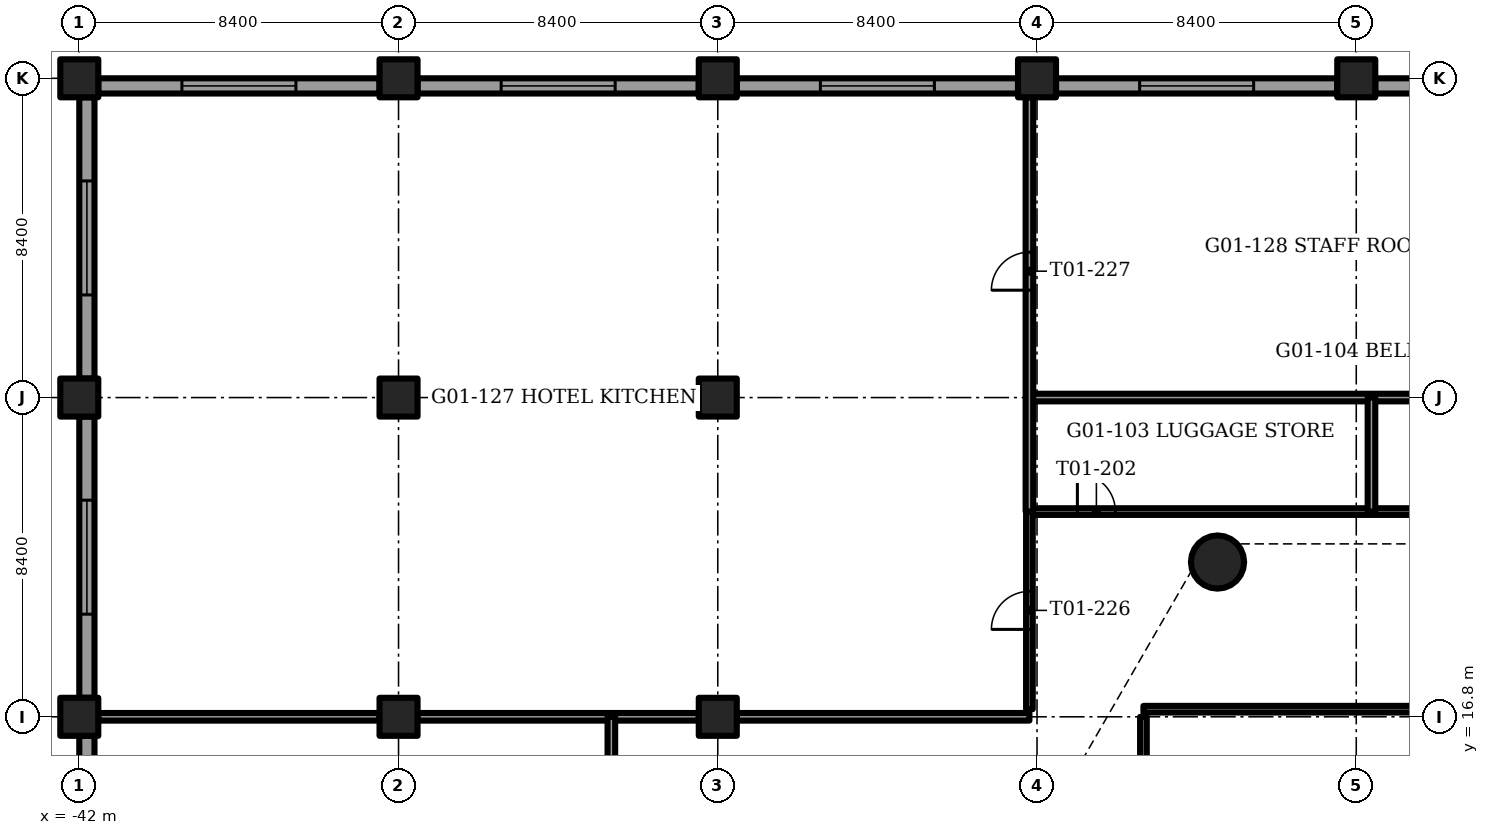
"""IFC4 building model, lengths in metres.
Left out: names, types, materials, properties, quantities, classifications, styles, units other than length and angle.
Written with IfcOpenShell. Run it as: python <this file> out.ifc"""

import sys

from ifc_helpers import new_model, si_unit, direction, frame, frame_2d, origin, origin_2d, place, context, subcontext, project, spatial, rectangle, circle, extrude, element, fill, save


model = new_model("IFC4")
c1 = context("Model", 3, precision=1e-05, world=origin(), true_north=direction((0.0, 1.0)))
c2 = subcontext(c1, "Body", "Model", "MODEL_VIEW")
j1 = project(units=[si_unit("LENGTHUNIT", "METRE"), si_unit("PLANEANGLEUNIT", "RADIAN")], contexts=[c1])
p1 = place(None, origin())
s1 = spatial("IfcSite", under=j1, at=p1, CompositionType="ELEMENT")
p2 = place(p1, origin())
s2 = spatial("IfcBuilding", under=s1, at=p2, CompositionType="ELEMENT")
p3 = place(p2, frame((0.0, 0.0, 6.0)))
s3 = spatial("IfcBuildingStorey", under=s2, at=p3, CompositionType="ELEMENT", Elevation=6.0)
for number, where, z_axis, x_axis in (
    (1, (-42.0, 16.8, -0.35), (0.0, 0.0, 1.0), (1.0, 0.0, 0.0)),
    (2, (-42.0, 25.2, -0.35), (0.0, 0.0, 1.0), (1.0, 0.0, 0.0)),
    (3, (-42.0, 33.6, -0.35), (0.0, 0.0, 1.0), (1.0, 0.0, 0.0)),
    (4, (-33.6, 16.8, -0.35), (0.0, 0.0, 1.0), (1.0, 0.0, 0.0)),
    (5, (-33.6, 25.2, -0.35), (0.0, 0.0, 1.0), (1.0, 0.0, 0.0)),
    (6, (-33.6, 33.6, -0.35), (0.0, 0.0, 1.0), (1.0, 0.0, 0.0)),
    (7, (-25.2, 16.8, -0.35), (0.0, 0.0, 1.0), (1.0, 0.0, 0.0)),
    (8, (-25.2, 25.2, -0.35), (0.0, 0.0, 1.0), (1.0, 0.0, 0.0)),
    (9, (-25.2, 33.6, -0.35), (0.0, 0.0, 1.0), (1.0, 0.0, 0.0)),
    (10, (-16.8, 33.6, -0.35), (0.0, 0.0, 1.0), (1.0, 0.0, 0.0)),
    (11, (-8.4, 33.6, -0.35), (0.0, 0.0, 1.0), (1.0, 0.0, 0.0)),
):
    element("IfcColumn", number, at=place(p3, frame(where, z_axis=z_axis, x_axis=x_axis)), inside=s3, PredefinedType="COLUMN", context=c2, shape_type="SweptSolid", body=[
        extrude(rectangle(XDim=1.0, YDim=1.0, at=origin_2d()), origin(), (0.0, 0.0, 1.0), 4.0),
    ])
p4 = place(p3, frame((-12.051, 20.872, -1.2), z_axis=(0.0, 0.0, 1.0), x_axis=(1.0, 0.0, 0.0)))
e12 = element("IfcColumn", 12, at=p4, inside=s3, PredefinedType="COLUMN", context=c2, shape_type="SweptSolid", body=[
    extrude(circle(Radius=0.7, at=origin_2d()), origin(), (0.0, 0.0, 1.0), 4.0),
])
p5 = place(p3, frame((-41.5, 33.4, 0.0), z_axis=(0.0, 0.0, 1.0), x_axis=(1.0, 0.0, 0.0)))
e13 = element("IfcWall", 13, at=p5, inside=s3, PredefinedType="SOLIDWALL", context=c2, shape_type="SweptSolid", body=[
    extrude(rectangle(XDim=7.4, YDim=0.4, at=frame_2d((3.7, 0.0))), origin(), (0.0, 0.0, 1.0), 3.65),
])
p6 = place(p5, frame((2.2, 0.0, 1.0)))
e14 = element("IfcOpeningElement", 14, at=p6, cuts=e13, PredefinedType="OPENING", context=c2, shape_type="SweptSolid", body=[
    extrude(rectangle(XDim=3.0, YDim=2.2, at=frame_2d((1.5, 1.1))), frame((0.0, 0.2, 0.0), z_axis=(0.0, -1.0, 0.0), x_axis=(1.0, 0.0, 0.0)), (0.0, 0.0, 1.0), 0.4),
])
p7 = place(p3, frame((-33.1, 33.4, 0.0), z_axis=(0.0, 0.0, 1.0), x_axis=(1.0, 0.0, 0.0)))
e15 = element("IfcWall", 15, at=p7, inside=s3, PredefinedType="SOLIDWALL", context=c2, shape_type="SweptSolid", body=[
    extrude(rectangle(XDim=7.4, YDim=0.4, at=frame_2d((3.7, 0.0))), origin(), (0.0, 0.0, 1.0), 3.65),
])
p8 = place(p7, frame((2.2, 0.0, 1.0)))
e16 = element("IfcOpeningElement", 16, at=p8, cuts=e15, PredefinedType="OPENING", context=c2, shape_type="SweptSolid", body=[
    extrude(rectangle(XDim=3.0, YDim=2.2, at=frame_2d((1.5, 1.1))), frame((0.0, 0.2, 0.0), z_axis=(0.0, -1.0, 0.0), x_axis=(1.0, 0.0, 0.0)), (0.0, 0.0, 1.0), 0.4),
])
p9 = place(p3, frame((-24.7, 33.4, 0.0), z_axis=(0.0, 0.0, 1.0), x_axis=(1.0, 0.0, 0.0)))
e17 = element("IfcWall", 17, at=p9, inside=s3, PredefinedType="SOLIDWALL", context=c2, shape_type="SweptSolid", body=[
    extrude(rectangle(XDim=7.4, YDim=0.4, at=frame_2d((3.7, 0.0))), origin(), (0.0, 0.0, 1.0), 3.65),
])
p10 = place(p9, frame((2.2, 0.0, 1.0)))
e18 = element("IfcOpeningElement", 18, at=p10, cuts=e17, PredefinedType="OPENING", context=c2, shape_type="SweptSolid", body=[
    extrude(rectangle(XDim=3.0, YDim=2.2, at=frame_2d((1.5, 1.1))), frame((0.0, 0.2, 0.0), z_axis=(0.0, -1.0, 0.0), x_axis=(1.0, 0.0, 0.0)), (0.0, 0.0, 1.0), 0.4),
])
p11 = place(p3, frame((-16.3, 33.4, 0.0), z_axis=(0.0, 0.0, 1.0), x_axis=(1.0, 0.0, 0.0)))
e19 = element("IfcWall", 19, at=p11, inside=s3, PredefinedType="SOLIDWALL", context=c2, shape_type="SweptSolid", body=[
    extrude(rectangle(XDim=7.4, YDim=0.4, at=frame_2d((3.7, 0.0))), origin(), (0.0, 0.0, 1.0), 3.65),
])
p12 = place(p11, frame((2.2, 0.0, 1.0)))
e20 = element("IfcOpeningElement", 20, at=p12, cuts=e19, PredefinedType="OPENING", context=c2, shape_type="SweptSolid", body=[
    extrude(rectangle(XDim=3.0, YDim=2.2, at=frame_2d((1.5, 1.1))), frame((0.0, 0.2, 0.0), z_axis=(0.0, -1.0, 0.0), x_axis=(1.0, 0.0, 0.0)), (0.0, 0.0, 1.0), 0.4),
])
p13 = place(p3, frame((-7.9, 33.4, 0.0), z_axis=(0.0, 0.0, 1.0), x_axis=(1.0, 0.0, 0.0)))
e21 = element("IfcWall", 21, at=p13, inside=s3, PredefinedType="SOLIDWALL", context=c2, shape_type="SweptSolid", body=[
    extrude(rectangle(XDim=7.4, YDim=0.4, at=frame_2d((3.7, 0.0))), origin(), (0.0, 0.0, 1.0), 3.65),
])
p14 = place(p13, frame((2.2, 0.0, 1.0)))
e22 = element("IfcOpeningElement", 22, at=p14, cuts=e21, PredefinedType="OPENING", context=c2, shape_type="SweptSolid", body=[
    extrude(rectangle(XDim=3.0, YDim=2.2, at=frame_2d((1.5, 1.1))), frame((0.0, 0.2, 0.0), z_axis=(0.0, -1.0, 0.0), x_axis=(1.0, 0.0, 0.0)), (0.0, 0.0, 1.0), 0.4),
])
p15 = place(p3, frame((-41.8, 8.9, 0.0), z_axis=(0.0, 0.0, 1.0), x_axis=(0.0, 1.0, 0.0)))
e23 = element("IfcWall", 23, at=p15, inside=s3, PredefinedType="SOLIDWALL", context=c2, shape_type="SweptSolid", body=[
    extrude(rectangle(XDim=7.4, YDim=0.4, at=frame_2d((3.7, 0.0))), origin(), (0.0, 0.0, 1.0), 3.65),
])
p16 = place(p15, frame((2.2, 0.0, 1.0)))
e24 = element("IfcOpeningElement", 24, at=p16, cuts=e23, PredefinedType="OPENING", context=c2, shape_type="SweptSolid", body=[
    extrude(rectangle(XDim=3.0, YDim=2.2, at=frame_2d((1.5, 1.1))), frame((0.0, 0.2, 0.0), z_axis=(0.0, -1.0, 0.0), x_axis=(1.0, 0.0, 0.0)), (0.0, 0.0, 1.0), 0.4),
])
p17 = place(p3, frame((-41.8, 17.3, 0.0), z_axis=(0.0, 0.0, 1.0), x_axis=(0.0, 1.0, 0.0)))
e25 = element("IfcWall", 25, at=p17, inside=s3, PredefinedType="SOLIDWALL", context=c2, shape_type="SweptSolid", body=[
    extrude(rectangle(XDim=7.4, YDim=0.4, at=frame_2d((3.7, 0.0))), origin(), (0.0, 0.0, 1.0), 3.65),
])
p18 = place(p17, frame((2.2, 0.0, 1.0)))
e26 = element("IfcOpeningElement", 26, at=p18, cuts=e25, PredefinedType="OPENING", context=c2, shape_type="SweptSolid", body=[
    extrude(rectangle(XDim=3.0, YDim=2.2, at=frame_2d((1.5, 1.1))), frame((0.0, 0.2, 0.0), z_axis=(0.0, -1.0, 0.0), x_axis=(1.0, 0.0, 0.0)), (0.0, 0.0, 1.0), 0.4),
])
p19 = place(p3, frame((-41.8, 25.7, 0.0), z_axis=(0.0, 0.0, 1.0), x_axis=(0.0, 1.0, 0.0)))
e27 = element("IfcWall", 27, at=p19, inside=s3, PredefinedType="SOLIDWALL", context=c2, shape_type="SweptSolid", body=[
    extrude(rectangle(XDim=7.4, YDim=0.4, at=frame_2d((3.7, 0.0))), origin(), (0.0, 0.0, 1.0), 3.65),
])
p20 = place(p19, frame((2.2, 0.0, 1.0)))
e28 = element("IfcOpeningElement", 28, at=p20, cuts=e27, PredefinedType="OPENING", context=c2, shape_type="SweptSolid", body=[
    extrude(rectangle(XDim=3.0, YDim=2.2, at=frame_2d((1.5, 1.1))), frame((0.0, 0.2, 0.0), z_axis=(0.0, -1.0, 0.0), x_axis=(1.0, 0.0, 0.0)), (0.0, 0.0, 1.0), 0.4),
])
p21 = place(p3, frame((-14.0, 17.0, 0.0), z_axis=(0.0, 0.0, 1.0), x_axis=(1.0, 0.0, 0.0)))
e29 = element("IfcWall", 29, at=p21, inside=s3, PredefinedType="PARTITIONING", context=c2, shape_type="SweptSolid", body=[
    extrude(rectangle(XDim=28.0, YDim=0.175, at=frame_2d((14.0, 0.0))), origin(), (0.0, 0.0, 1.0), 3.65),
])
p22 = place(p21, frame((13.2, 0.0, 0.0)))
e30 = element("IfcOpeningElement", 30, at=p22, cuts=e29, PredefinedType="OPENING", context=c2, shape_type="SweptSolid", body=[
    extrude(rectangle(XDim=1.6, YDim=2.1, at=frame_2d((0.8, 1.05))), frame((0.0, 0.087, 0.0), z_axis=(0.0, -1.0, 0.0), x_axis=(1.0, 0.0, 0.0)), (0.0, 0.0, 1.0), 0.175),
])
p23 = place(p3, frame((-17.0, 22.2, 0.0), z_axis=(0.0, 0.0, 1.0), x_axis=(1.0, 0.0, 0.0)))
e31 = element("IfcWall", 31, at=p23, inside=s3, PredefinedType="PARTITIONING", context=c2, shape_type="SweptSolid", body=[
    extrude(rectangle(XDim=42.2, YDim=0.175, at=frame_2d((21.1, 0.0))), origin(), (0.0, 0.0, 1.0), 3.65),
])
p24 = place(p23, frame((1.262, 0.0, 0.0)))
e32 = element("IfcOpeningElement", 32, at=p24, cuts=e31, PredefinedType="OPENING", context=c2, shape_type="SweptSolid", body=[
    extrude(rectangle(XDim=1.0, YDim=2.1, at=frame_2d((0.5, 1.05))), frame((0.0, 0.087, 0.0), z_axis=(0.0, -1.0, 0.0), x_axis=(1.0, 0.0, 0.0)), (0.0, 0.0, 1.0), 0.175),
])
p25 = place(p23, frame((15.344, 0.0, 0.0)))
e33 = element("IfcOpeningElement", 33, at=p25, cuts=e31, PredefinedType="OPENING", context=c2, shape_type="SweptSolid", body=[
    extrude(rectangle(XDim=1.0, YDim=2.1, at=frame_2d((0.5, 1.05))), frame((0.0, 0.087, 0.0), z_axis=(0.0, -1.0, 0.0), x_axis=(1.0, 0.0, 0.0)), (0.0, 0.0, 1.0), 0.175),
])
p26 = place(p23, frame((17.656, 0.0, 0.0)))
e34 = element("IfcOpeningElement", 34, at=p26, cuts=e31, PredefinedType="OPENING", context=c2, shape_type="SweptSolid", body=[
    extrude(rectangle(XDim=1.0, YDim=2.1, at=frame_2d((0.5, 1.05))), frame((0.0, 0.087, 0.0), z_axis=(0.0, -1.0, 0.0), x_axis=(1.0, 0.0, 0.0)), (0.0, 0.0, 1.0), 0.175),
])
p27 = place(p23, frame((31.488, 0.0, 0.0)))
e35 = element("IfcOpeningElement", 35, at=p27, cuts=e31, PredefinedType="OPENING", context=c2, shape_type="SweptSolid", body=[
    extrude(rectangle(XDim=1.0, YDim=2.1, at=frame_2d((0.5, 1.05))), frame((0.0, 0.087, 0.0), z_axis=(0.0, -1.0, 0.0), x_axis=(1.0, 0.0, 0.0)), (0.0, 0.0, 1.0), 0.175),
])
p28 = place(p23, frame((37.35, 0.0, 0.0)))
e36 = element("IfcOpeningElement", 36, at=p28, cuts=e31, PredefinedType="OPENING", context=c2, shape_type="SweptSolid", body=[
    extrude(rectangle(XDim=1.0, YDim=2.1, at=frame_2d((0.5, 1.05))), frame((0.0, 0.087, 0.0), z_axis=(0.0, -1.0, 0.0), x_axis=(1.0, 0.0, 0.0)), (0.0, 0.0, 1.0), 0.175),
])
p29 = place(p3, frame((-17.0, 17.0, 0.0), z_axis=(0.0, 0.0, 1.0), x_axis=(0.0, 1.0, 0.0)))
e37 = element("IfcWall", 37, at=p29, inside=s3, PredefinedType="PARTITIONING", context=c2, shape_type="SweptSolid", body=[
    extrude(rectangle(XDim=5.2, YDim=0.175, at=frame_2d((2.6, 0.0))), origin(), (0.0, 0.0, 1.0), 3.65),
])
p30 = place(p29, frame((2.1, 0.0, 0.0)))
e38 = element("IfcOpeningElement", 38, at=p30, cuts=e37, PredefinedType="OPENING", context=c2, shape_type="SweptSolid", body=[
    extrude(rectangle(XDim=1.0, YDim=2.1, at=frame_2d((0.5, 1.05))), frame((0.0, 0.087, 0.0), z_axis=(0.0, -1.0, 0.0), x_axis=(1.0, 0.0, 0.0)), (0.0, 0.0, 1.0), 0.175),
])
p31 = place(p3, frame((-14.0, -29.195, 0.0), z_axis=(0.0, 0.0, 1.0), x_axis=(0.0, 1.0, 0.0)))
e39 = element("IfcWall", 39, at=p31, inside=s3, PredefinedType="PARTITIONING", context=c2, shape_type="SweptSolid", body=[
    extrude(rectangle(XDim=45.995, YDim=0.175, at=frame_2d((22.998, 0.0))), origin(), (0.0, 0.0, 1.0), 2.8),
])
p32 = place(p31, frame((4.395, 0.0, 0.0)))
e40 = element("IfcOpeningElement", 40, at=p32, cuts=e39, PredefinedType="OPENING", context=c2, shape_type="SweptSolid", body=[
    extrude(rectangle(XDim=1.6, YDim=2.1, at=frame_2d((0.8, 1.05))), frame((0.0, 0.087, 0.0), z_axis=(0.0, -1.0, 0.0), x_axis=(1.0, 0.0, 0.0)), (0.0, 0.0, 1.0), 0.175),
])
p33 = place(p31, frame((9.815, 0.0, 0.0)))
e41 = element("IfcOpeningElement", 41, at=p33, cuts=e39, PredefinedType="OPENING", context=c2, shape_type="SweptSolid", body=[
    extrude(rectangle(XDim=0.9, YDim=2.1, at=frame_2d((0.45, 1.05))), frame((0.0, 0.087, 0.0), z_axis=(0.0, -1.0, 0.0), x_axis=(1.0, 0.0, 0.0)), (0.0, 0.0, 1.0), 0.175),
])
p34 = place(p31, frame((20.595, 0.0, 0.0)))
e42 = element("IfcOpeningElement", 42, at=p34, cuts=e39, PredefinedType="OPENING", context=c2, shape_type="SweptSolid", body=[
    extrude(rectangle(XDim=1.0, YDim=2.1, at=frame_2d((0.5, 1.05))), frame((0.0, 0.087, 0.0), z_axis=(0.0, -1.0, 0.0), x_axis=(1.0, 0.0, 0.0)), (0.0, 0.0, 1.0), 0.175),
])
p35 = place(p31, frame((28.595, 0.0, 0.0)))
e43 = element("IfcOpeningElement", 43, at=p35, cuts=e39, PredefinedType="OPENING", context=c2, shape_type="SweptSolid", body=[
    extrude(rectangle(XDim=1.0, YDim=2.1, at=frame_2d((0.5, 1.05))), frame((0.0, 0.087, 0.0), z_axis=(0.0, -1.0, 0.0), x_axis=(1.0, 0.0, 0.0)), (0.0, 0.0, 1.0), 0.175),
])
p36 = place(p31, frame((35.445, 0.0, 0.0)))
e44 = element("IfcOpeningElement", 44, at=p36, cuts=e39, PredefinedType="OPENING", context=c2, shape_type="SweptSolid", body=[
    extrude(rectangle(XDim=1.0, YDim=2.1, at=frame_2d((0.5, 1.05))), frame((0.0, 0.087, 0.0), z_axis=(0.0, -1.0, 0.0), x_axis=(1.0, 0.0, 0.0)), (0.0, 0.0, 1.0), 0.175),
])
p37 = place(p31, frame((41.628, 0.0, 0.0)))
e45 = element("IfcOpeningElement", 45, at=p37, cuts=e39, PredefinedType="OPENING", context=c2, shape_type="SweptSolid", body=[
    extrude(rectangle(XDim=1.0, YDim=2.1, at=frame_2d((0.5, 1.05))), frame((0.0, 0.087, 0.0), z_axis=(0.0, -1.0, 0.0), x_axis=(1.0, 0.0, 0.0)), (0.0, 0.0, 1.0), 0.175),
])
p38 = place(p3, frame((-41.5, 16.8, 0.0), z_axis=(0.0, 0.0, 1.0), x_axis=(1.0, 0.0, 0.0)))
e46 = element("IfcWall", 46, at=p38, inside=s3, PredefinedType="PARTITIONING", context=c2, shape_type="SweptSolid", body=[
    extrude(rectangle(XDim=7.4, YDim=0.2, at=frame_2d((3.7, 0.0))), origin(), (0.0, 0.0, 1.0), 3.65),
])
p39 = place(p3, frame((-33.1, 16.8, 0.0), z_axis=(0.0, 0.0, 1.0), x_axis=(1.0, 0.0, 0.0)))
e47 = element("IfcWall", 47, at=p39, inside=s3, PredefinedType="PARTITIONING", context=c2, shape_type="SweptSolid", body=[
    extrude(rectangle(XDim=7.4, YDim=0.2, at=frame_2d((3.7, 0.0))), origin(), (0.0, 0.0, 1.0), 3.65),
])
p40 = place(p3, frame((-24.7, 16.8, 0.0), z_axis=(0.0, 0.0, 1.0), x_axis=(1.0, 0.0, 0.0)))
e48 = element("IfcWall", 48, at=p40, inside=s3, PredefinedType="PARTITIONING", context=c2, shape_type="SweptSolid", body=[
    extrude(rectangle(XDim=7.7, YDim=0.2, at=frame_2d((3.85, 0.0))), origin(), (0.0, 0.0, 1.0), 3.65),
])
p41 = place(p3, frame((-17.0, 25.2, 0.0), z_axis=(0.0, 0.0, 1.0), x_axis=(1.0, 0.0, 0.0)))
e49 = element("IfcWall", 49, at=p41, inside=s3, PredefinedType="PARTITIONING", context=c2, shape_type="SweptSolid", body=[
    extrude(rectangle(XDim=28.019, YDim=0.2, at=frame_2d((14.01, 0.0))), origin(), (0.0, 0.0, 1.0), 3.65),
])
p42 = place(p41, frame((26.209, 0.0, 0.0)))
e50 = element("IfcOpeningElement", 50, at=p42, cuts=e49, PredefinedType="OPENING", context=c2, shape_type="SweptSolid", body=[
    extrude(rectangle(XDim=1.0, YDim=2.1, at=frame_2d((0.5, 1.05))), frame((0.0, 0.1, 0.0), z_axis=(0.0, -1.0, 0.0), x_axis=(1.0, 0.0, 0.0)), (0.0, 0.0, 1.0), 0.2),
])
p43 = place(p3, frame((-28.0, -21.0, 0.0), z_axis=(0.0, 0.0, 1.0), x_axis=(0.0, 1.0, 0.0)))
e51 = element("IfcWall", 51, at=p43, inside=s3, PredefinedType="PARTITIONING", context=c2, shape_type="SweptSolid", body=[
    extrude(rectangle(XDim=37.8, YDim=0.2, at=frame_2d((18.9, 0.0))), origin(), (0.0, 0.0, 1.0), 3.65),
])
p44 = place(p43, frame((19.45, 0.0, 0.0)))
e52 = element("IfcOpeningElement", 52, at=p44, cuts=e51, PredefinedType="OPENING", context=c2, shape_type="SweptSolid", body=[
    extrude(rectangle(XDim=1.0, YDim=2.1, at=frame_2d((0.5, 1.05))), frame((0.0, 0.1, 0.0), z_axis=(0.0, -1.0, 0.0), x_axis=(1.0, 0.0, 0.0)), (0.0, 0.0, 1.0), 0.2),
])
p45 = place(p3, frame((-17.0, 22.2, 0.0), z_axis=(0.0, 0.0, 1.0), x_axis=(0.0, 1.0, 0.0)))
e53 = element("IfcWall", 53, at=p45, inside=s3, PredefinedType="PARTITIONING", context=c2, shape_type="SweptSolid", body=[
    extrude(rectangle(XDim=10.9, YDim=0.2, at=frame_2d((5.45, 0.0))), origin(), (0.0, 0.0, 1.0), 3.65),
])
p46 = place(p45, frame((5.825, 0.0, 0.0)))
e54 = element("IfcOpeningElement", 54, at=p46, cuts=e53, PredefinedType="OPENING", context=c2, shape_type="SweptSolid", body=[
    extrude(rectangle(XDim=1.0, YDim=2.1, at=frame_2d((0.5, 1.05))), frame((0.0, 0.1, 0.0), z_axis=(0.0, -1.0, 0.0), x_axis=(1.0, 0.0, 0.0)), (0.0, 0.0, 1.0), 0.2),
])
p47 = place(p3, frame((-8.0, 22.2, 0.0), z_axis=(0.0, 0.0, 1.0), x_axis=(0.0, 1.0, 0.0)))
e55 = element("IfcWall", 55, at=p47, inside=s3, PredefinedType="PARTITIONING", context=c2, shape_type="SweptSolid", body=[
    extrude(rectangle(XDim=3.0, YDim=0.2, at=frame_2d((1.5, 0.0))), origin(), (0.0, 0.0, 1.0), 3.65),
])
p48 = place(p6, origin())
e56 = element("IfcWindow", 56, at=p48, inside=s3, PartitioningType="SINGLE_PANEL", PredefinedType="WINDOW", context=c2, shape_type="SweptSolid", body=[
    extrude(rectangle(XDim=3.0, YDim=2.2, at=frame_2d((1.5, 1.1))), frame((0.0, 0.03, 0.0), z_axis=(0.0, -1.0, 0.0), x_axis=(1.0, 0.0, 0.0)), (0.0, 0.0, 1.0), 0.06),
])
fill(e14, e56)
p49 = place(p8, origin())
e57 = element("IfcWindow", 57, at=p49, inside=s3, PartitioningType="SINGLE_PANEL", PredefinedType="WINDOW", context=c2, shape_type="SweptSolid", body=[
    extrude(rectangle(XDim=3.0, YDim=2.2, at=frame_2d((1.5, 1.1))), frame((0.0, 0.03, 0.0), z_axis=(0.0, -1.0, 0.0), x_axis=(1.0, 0.0, 0.0)), (0.0, 0.0, 1.0), 0.06),
])
fill(e16, e57)
p50 = place(p10, origin())
e58 = element("IfcWindow", 58, at=p50, inside=s3, PartitioningType="SINGLE_PANEL", PredefinedType="WINDOW", context=c2, shape_type="SweptSolid", body=[
    extrude(rectangle(XDim=3.0, YDim=2.2, at=frame_2d((1.5, 1.1))), frame((0.0, 0.03, 0.0), z_axis=(0.0, -1.0, 0.0), x_axis=(1.0, 0.0, 0.0)), (0.0, 0.0, 1.0), 0.06),
])
fill(e18, e58)
p51 = place(p12, origin())
e59 = element("IfcWindow", 59, at=p51, inside=s3, PartitioningType="SINGLE_PANEL", PredefinedType="WINDOW", context=c2, shape_type="SweptSolid", body=[
    extrude(rectangle(XDim=3.0, YDim=2.2, at=frame_2d((1.5, 1.1))), frame((0.0, 0.03, 0.0), z_axis=(0.0, -1.0, 0.0), x_axis=(1.0, 0.0, 0.0)), (0.0, 0.0, 1.0), 0.06),
])
fill(e20, e59)
p52 = place(p18, origin())
e60 = element("IfcWindow", 60, at=p52, inside=s3, PartitioningType="SINGLE_PANEL", PredefinedType="WINDOW", context=c2, shape_type="SweptSolid", body=[
    extrude(rectangle(XDim=3.0, YDim=2.2, at=frame_2d((1.5, 1.1))), frame((0.0, 0.03, 0.0), z_axis=(0.0, -1.0, 0.0), x_axis=(1.0, 0.0, 0.0)), (0.0, 0.0, 1.0), 0.06),
])
fill(e26, e60)
p53 = place(p20, origin())
e61 = element("IfcWindow", 61, at=p53, inside=s3, PartitioningType="SINGLE_PANEL", PredefinedType="WINDOW", context=c2, shape_type="SweptSolid", body=[
    extrude(rectangle(XDim=3.0, YDim=2.2, at=frame_2d((1.5, 1.1))), frame((0.0, 0.03, 0.0), z_axis=(0.0, -1.0, 0.0), x_axis=(1.0, 0.0, 0.0)), (0.0, 0.0, 1.0), 0.06),
])
fill(e28, e61)
p54 = place(p24, origin())
e62 = element("IfcDoor", 62, at=p54, inside=s3, OperationType="SINGLE_SWING_RIGHT", PredefinedType="DOOR", context=c2, shape_type="SweptSolid", body=[
    extrude(rectangle(XDim=1.0, YDim=2.1, at=frame_2d((0.5, 1.05))), frame((0.0, 0.025, 0.0), z_axis=(0.0, -1.0, 0.0), x_axis=(1.0, 0.0, 0.0)), (0.0, 0.0, 1.0), 0.05),
])
fill(e32, e62)
p55 = place(p30, origin())
e63 = element("IfcDoor", 63, at=p55, inside=s3, OperationType="SINGLE_SWING_RIGHT", PredefinedType="DOOR", context=c2, shape_type="SweptSolid", body=[
    extrude(rectangle(XDim=1.0, YDim=2.1, at=frame_2d((0.5, 1.05))), frame((0.0, 0.025, 0.0), z_axis=(0.0, -1.0, 0.0), x_axis=(1.0, 0.0, 0.0)), (0.0, 0.0, 1.0), 0.05),
])
fill(e38, e63)
p56 = place(p46, origin())
e64 = element("IfcDoor", 64, at=p56, inside=s3, OperationType="SINGLE_SWING_LEFT", PredefinedType="DOOR", context=c2, shape_type="SweptSolid", body=[
    extrude(rectangle(XDim=1.0, YDim=2.1, at=frame_2d((0.5, 1.05))), frame((0.0, 0.025, 0.0), z_axis=(0.0, -1.0, 0.0), x_axis=(1.0, 0.0, 0.0)), (0.0, 0.0, 1.0), 0.05),
])
fill(e54, e64)
save(model, sys.argv[1])
